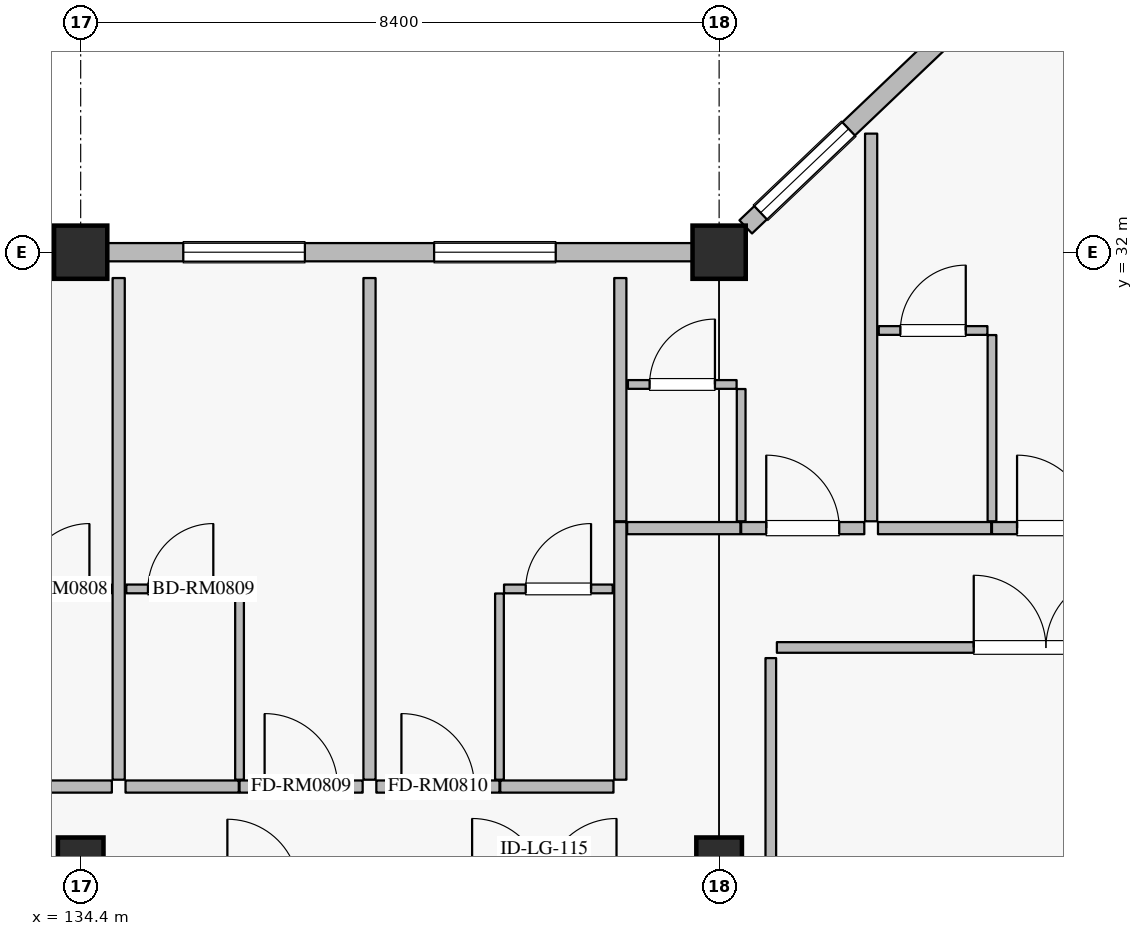
"""IFC4 building model, lengths in metres.
Left out: names, types, materials, properties, quantities, classifications, styles, units other than length and angle.
Written with IfcOpenShell. Run it as: python <this file> out.ifc"""

import sys

from ifc_helpers import new_model, si_unit, direction, frame, frame_2d, origin, origin_2d, place, context, subcontext, project, spatial, rectangle, extrude, element, fill, save


model = new_model("IFC4")
c1 = context("Model", 3, precision=1e-05, world=origin(), true_north=direction((0.0, 1.0)))
c2 = subcontext(c1, "Body", "Model", "MODEL_VIEW")
j1 = project(units=[si_unit("LENGTHUNIT", "METRE"), si_unit("PLANEANGLEUNIT", "RADIAN")], contexts=[c1])
p1 = place(None, origin())
s1 = spatial("IfcSite", under=j1, at=p1, CompositionType="ELEMENT")
p2 = place(p1, origin())
s2 = spatial("IfcBuilding", under=s1, at=p2, CompositionType="ELEMENT")
p3 = place(p2, frame((0.0, 0.0, 32.4)))
s3 = spatial("IfcBuildingStorey", under=s2, at=p3, CompositionType="ELEMENT", Elevation=32.4)
for number, where, z_axis, x_axis in (
    (1, (134.4, 32.0, 0.0), (0.0, 0.0, 1.0), (1.0, 0.0, 0.0)),
    (2, (142.8, 32.0, 0.0), (0.0, 0.0, 1.0), (1.0, 0.0, 0.0)),
):
    element("IfcColumn", number, at=place(p3, frame(where, z_axis=z_axis, x_axis=x_axis)), inside=s3, PredefinedType="COLUMN", context=c2, shape_type="SweptSolid", body=[
        extrude(rectangle(XDim=0.7, YDim=0.7, at=origin_2d()), origin(), (0.0, 0.0, 1.0), 3.6),
    ])
for number, where, z_axis, x_axis in (
    (3, (134.4, 24.0, 0.0), (0.0, 0.0, 1.0), (1.0, 0.0, 0.0)),
    (4, (142.8, 24.0, 0.0), (0.0, 0.0, 1.0), (1.0, 0.0, 0.0)),
):
    element("IfcColumn", number, at=place(p3, frame(where, z_axis=z_axis, x_axis=x_axis)), inside=s3, PredefinedType="COLUMN", context=c2, shape_type="SweptSolid", body=[
        extrude(rectangle(XDim=0.6, YDim=0.6, at=origin_2d()), origin(), (0.0, 0.0, 1.0), 3.6),
    ])
p4 = place(p3, frame((126.35, 32.0, 0.0), z_axis=(0.0, 0.0, 1.0), x_axis=(1.0, 0.0, 0.0)))
e5 = element("IfcWall", 5, at=p4, inside=s3, PredefinedType="SOLIDWALL", context=c2, shape_type="SweptSolid", body=[
    extrude(rectangle(XDim=7.7, YDim=0.24, at=frame_2d((3.85, 0.0))), origin(), (0.0, 0.0, 1.0), 2.94),
])
p5 = place(p4, frame((0.125, 0.0, 0.8)))
e6 = element("IfcOpeningElement", 6, at=p5, cuts=e5, PredefinedType="OPENING", context=c2, shape_type="SweptSolid", body=[
    extrude(rectangle(XDim=1.6, YDim=1.6, at=frame_2d((0.8, 0.8))), frame((0.0, 0.13, 0.0), z_axis=(0.0, -1.0, 0.0), x_axis=(1.0, 0.0, 0.0)), (0.0, 0.0, 1.0), 0.26),
])
p6 = place(p4, frame((2.8, 0.0, 0.8)))
e7 = element("IfcOpeningElement", 7, at=p6, cuts=e5, PredefinedType="OPENING", context=c2, shape_type="SweptSolid", body=[
    extrude(rectangle(XDim=1.6, YDim=1.6, at=frame_2d((0.8, 0.8))), frame((0.0, 0.13, 0.0), z_axis=(0.0, -1.0, 0.0), x_axis=(1.0, 0.0, 0.0)), (0.0, 0.0, 1.0), 0.26),
])
p7 = place(p4, frame((5.725, 0.0, 0.8)))
e8 = element("IfcOpeningElement", 8, at=p7, cuts=e5, PredefinedType="OPENING", context=c2, shape_type="SweptSolid", body=[
    extrude(rectangle(XDim=1.6, YDim=1.6, at=frame_2d((0.8, 0.8))), frame((0.0, 0.13, 0.0), z_axis=(0.0, -1.0, 0.0), x_axis=(1.0, 0.0, 0.0)), (0.0, 0.0, 1.0), 0.26),
])
p8 = place(p3, frame((134.75, 32.0, 0.0), z_axis=(0.0, 0.0, 1.0), x_axis=(1.0, 0.0, 0.0)))
e9 = element("IfcWall", 9, at=p8, inside=s3, PredefinedType="SOLIDWALL", context=c2, shape_type="SweptSolid", body=[
    extrude(rectangle(XDim=7.7, YDim=0.24, at=frame_2d((3.85, 0.0))), origin(), (0.0, 0.0, 1.0), 2.94),
])
p9 = place(p8, frame((1.0, 0.0, 0.8)))
e10 = element("IfcOpeningElement", 10, at=p9, cuts=e9, PredefinedType="OPENING", context=c2, shape_type="SweptSolid", body=[
    extrude(rectangle(XDim=1.6, YDim=1.6, at=frame_2d((0.8, 0.8))), frame((0.0, 0.13, 0.0), z_axis=(0.0, -1.0, 0.0), x_axis=(1.0, 0.0, 0.0)), (0.0, 0.0, 1.0), 0.26),
])
p10 = place(p8, frame((4.3, 0.0, 0.8)))
e11 = element("IfcOpeningElement", 11, at=p10, cuts=e9, PredefinedType="OPENING", context=c2, shape_type="SweptSolid", body=[
    extrude(rectangle(XDim=1.6, YDim=1.6, at=frame_2d((0.8, 0.8))), frame((0.0, 0.13, 0.0), z_axis=(0.0, -1.0, 0.0), x_axis=(1.0, 0.0, 0.0)), (0.0, 0.0, 1.0), 0.26),
])
p11 = place(p3, frame((143.15, 32.333, 0.0), z_axis=(0.0, 0.0, 1.0), x_axis=(0.724116091282, 0.689678103427, 0.0)))
e12 = element("IfcWall", 12, at=p11, inside=s3, PredefinedType="SOLIDWALL", context=c2, shape_type="SweptSolid", body=[
    extrude(rectangle(XDim=10.634, YDim=0.24, at=frame_2d((5.317, 0.0))), origin(), (0.0, 0.0, 1.0), 2.94),
])
p12 = place(p11, frame((0.27, 0.0, 0.8)))
e13 = element("IfcOpeningElement", 13, at=p12, cuts=e12, PredefinedType="OPENING", context=c2, shape_type="SweptSolid", body=[
    extrude(rectangle(XDim=1.6, YDim=1.6, at=frame_2d((0.8, 0.8))), frame((0.0, 0.13, 0.0), z_axis=(0.0, -1.0, 0.0), x_axis=(1.0, 0.0, 0.0)), (0.0, 0.0, 1.0), 0.26),
])
p13 = place(p11, frame((3.757, 0.0, 0.8)))
e14 = element("IfcOpeningElement", 14, at=p13, cuts=e12, PredefinedType="OPENING", context=c2, shape_type="SweptSolid", body=[
    extrude(rectangle(XDim=1.6, YDim=1.6, at=frame_2d((0.8, 0.8))), frame((0.0, 0.13, 0.0), z_axis=(0.0, -1.0, 0.0), x_axis=(1.0, 0.0, 0.0)), (0.0, 0.0, 1.0), 0.26),
])
p14 = place(p11, frame((8.004, 0.0, 0.8)))
e15 = element("IfcOpeningElement", 15, at=p14, cuts=e12, PredefinedType="OPENING", context=c2, shape_type="SweptSolid", body=[
    extrude(rectangle(XDim=1.6, YDim=1.6, at=frame_2d((0.8, 0.8))), frame((0.0, 0.13, 0.0), z_axis=(0.0, -1.0, 0.0), x_axis=(1.0, 0.0, 0.0)), (0.0, 0.0, 1.0), 0.26),
])
p15 = place(p3, frame((133.32, 24.97, 0.0), z_axis=(0.0, 0.0, 1.0), x_axis=(1.0, 0.0, 0.0)))
e16 = element("IfcWall", 16, at=p15, inside=s3, PredefinedType="PARTITIONING", context=c2, shape_type="SweptSolid", body=[
    extrude(rectangle(XDim=1.49, YDim=0.16, at=frame_2d((0.745, 0.0))), origin(), (0.0, 0.0, 1.0), 3.335),
])
p16 = place(p3, frame((133.37, 27.57, 0.0), z_axis=(0.0, 0.0, 1.0), x_axis=(1.0, 0.0, 0.0)))
e17 = element("IfcWall", 17, at=p16, inside=s3, PredefinedType="PARTITIONING", context=c2, shape_type="SweptSolid", body=[
    extrude(rectangle(XDim=1.43, YDim=0.115, at=frame_2d((0.715, 0.0))), origin(), (0.0, 0.0, 1.0), 3.335),
])
p17 = place(p16, frame((0.285, 0.0, 0.0)))
e18 = element("IfcOpeningElement", 18, at=p17, cuts=e17, PredefinedType="OPENING", context=c2, shape_type="SweptSolid", body=[
    extrude(rectangle(XDim=0.86, YDim=2.12, at=frame_2d((0.43, 1.06))), frame((0.0, 0.067, 0.0), z_axis=(0.0, -1.0, 0.0), x_axis=(1.0, 0.0, 0.0)), (0.0, 0.0, 1.0), 0.135),
])
p18 = place(p3, frame((134.99, 24.97, 0.0), z_axis=(0.0, 0.0, 1.0), x_axis=(1.0, 0.0, 0.0)))
e19 = element("IfcWall", 19, at=p18, inside=s3, PredefinedType="PARTITIONING", context=c2, shape_type="SweptSolid", body=[
    extrude(rectangle(XDim=1.49, YDim=0.16, at=frame_2d((0.745, 0.0))), origin(), (0.0, 0.0, 1.0), 3.335),
])
p19 = place(p3, frame((136.49, 24.97, 0.0), z_axis=(0.0, 0.0, 1.0), x_axis=(1.0, 0.0, 0.0)))
e20 = element("IfcWall", 20, at=p19, inside=s3, PredefinedType="PARTITIONING", context=c2, shape_type="SweptSolid", body=[
    extrude(rectangle(XDim=1.62, YDim=0.16, at=frame_2d((0.81, 0.0))), origin(), (0.0, 0.0, 1.0), 3.335),
])
p20 = place(p19, frame((0.33, 0.0, 0.0)))
e21 = element("IfcOpeningElement", 21, at=p20, cuts=e20, PredefinedType="OPENING", context=c2, shape_type="SweptSolid", body=[
    extrude(rectangle(XDim=0.96, YDim=2.2, at=frame_2d((0.48, 1.1))), frame((0.0, 0.09, 0.0), z_axis=(0.0, -1.0, 0.0), x_axis=(1.0, 0.0, 0.0)), (0.0, 0.0, 1.0), 0.18),
])
p21 = place(p3, frame((136.49, 25.06, 0.0), z_axis=(0.0, 0.0, 1.0), x_axis=(0.0, 1.0, 0.0)))
e22 = element("IfcWall", 22, at=p21, inside=s3, PredefinedType="PARTITIONING", context=c2, shape_type="SweptSolid", body=[
    extrude(rectangle(XDim=2.45, YDim=0.115, at=frame_2d((1.225, 0.0))), origin(), (0.0, 0.0, 1.0), 3.335),
])
p22 = place(p3, frame((135.0, 27.57, 0.0), z_axis=(0.0, 0.0, 1.0), x_axis=(1.0, 0.0, 0.0)))
e23 = element("IfcWall", 23, at=p22, inside=s3, PredefinedType="PARTITIONING", context=c2, shape_type="SweptSolid", body=[
    extrude(rectangle(XDim=1.43, YDim=0.115, at=frame_2d((0.715, 0.0))), origin(), (0.0, 0.0, 1.0), 3.335),
])
p23 = place(p22, frame((0.285, 0.0, 0.0)))
e24 = element("IfcOpeningElement", 24, at=p23, cuts=e23, PredefinedType="OPENING", context=c2, shape_type="SweptSolid", body=[
    extrude(rectangle(XDim=0.86, YDim=2.12, at=frame_2d((0.43, 1.06))), frame((0.0, 0.067, 0.0), z_axis=(0.0, -1.0, 0.0), x_axis=(1.0, 0.0, 0.0)), (0.0, 0.0, 1.0), 0.135),
])
p24 = place(p3, frame((134.9, 25.06, 0.0), z_axis=(0.0, 0.0, 1.0), x_axis=(0.0, 1.0, 0.0)))
e25 = element("IfcWall", 25, at=p24, inside=s3, PredefinedType="PARTITIONING", context=c2, shape_type="SweptSolid", body=[
    extrude(rectangle(XDim=6.6, YDim=0.16, at=frame_2d((3.3, 0.0))), origin(), (0.0, 0.0, 1.0), 3.335),
])
p25 = place(p3, frame((138.29, 24.97, 0.0), z_axis=(0.0, 0.0, 1.0), x_axis=(1.0, 0.0, 0.0)))
e26 = element("IfcWall", 26, at=p25, inside=s3, PredefinedType="PARTITIONING", context=c2, shape_type="SweptSolid", body=[
    extrude(rectangle(XDim=1.62, YDim=0.16, at=frame_2d((0.81, 0.0))), origin(), (0.0, 0.0, 1.0), 3.335),
])
p26 = place(p25, frame((0.33, 0.0, 0.0)))
e27 = element("IfcOpeningElement", 27, at=p26, cuts=e26, PredefinedType="OPENING", context=c2, shape_type="SweptSolid", body=[
    extrude(rectangle(XDim=0.96, YDim=2.2, at=frame_2d((0.48, 1.1))), frame((0.0, 0.09, 0.0), z_axis=(0.0, -1.0, 0.0), x_axis=(1.0, 0.0, 0.0)), (0.0, 0.0, 1.0), 0.18),
])
p27 = place(p3, frame((139.92, 24.97, 0.0), z_axis=(0.0, 0.0, 1.0), x_axis=(1.0, 0.0, 0.0)))
e28 = element("IfcWall", 28, at=p27, inside=s3, PredefinedType="PARTITIONING", context=c2, shape_type="SweptSolid", body=[
    extrude(rectangle(XDim=1.49, YDim=0.16, at=frame_2d((0.745, 0.0))), origin(), (0.0, 0.0, 1.0), 3.335),
])
p28 = place(p3, frame((139.91, 25.06, 0.0), z_axis=(0.0, 0.0, 1.0), x_axis=(0.0, 1.0, 0.0)))
e29 = element("IfcWall", 29, at=p28, inside=s3, PredefinedType="PARTITIONING", context=c2, shape_type="SweptSolid", body=[
    extrude(rectangle(XDim=2.45, YDim=0.115, at=frame_2d((1.225, 0.0))), origin(), (0.0, 0.0, 1.0), 3.335),
])
p29 = place(p3, frame((139.97, 27.57, 0.0), z_axis=(0.0, 0.0, 1.0), x_axis=(1.0, 0.0, 0.0)))
e30 = element("IfcWall", 30, at=p29, inside=s3, PredefinedType="PARTITIONING", context=c2, shape_type="SweptSolid", body=[
    extrude(rectangle(XDim=1.43, YDim=0.115, at=frame_2d((0.715, 0.0))), origin(), (0.0, 0.0, 1.0), 3.335),
])
p30 = place(p29, frame((0.285, 0.0, 0.0)))
e31 = element("IfcOpeningElement", 31, at=p30, cuts=e30, PredefinedType="OPENING", context=c2, shape_type="SweptSolid", body=[
    extrude(rectangle(XDim=0.86, YDim=2.12, at=frame_2d((0.43, 1.06))), frame((0.0, 0.067, 0.0), z_axis=(0.0, -1.0, 0.0), x_axis=(1.0, 0.0, 0.0)), (0.0, 0.0, 1.0), 0.135),
])
p31 = place(p3, frame((138.2, 25.06, 0.0), z_axis=(0.0, 0.0, 1.0), x_axis=(0.0, 1.0, 0.0)))
e32 = element("IfcWall", 32, at=p31, inside=s3, PredefinedType="PARTITIONING", context=c2, shape_type="SweptSolid", body=[
    extrude(rectangle(XDim=6.6, YDim=0.16, at=frame_2d((3.3, 0.0))), origin(), (0.0, 0.0, 1.0), 3.335),
])
p32 = place(p3, frame((141.5, 25.06, 0.0), z_axis=(0.0, 0.0, 1.0), x_axis=(0.0, 1.0, 0.0)))
e33 = element("IfcWall", 33, at=p32, inside=s3, PredefinedType="PARTITIONING", context=c2, shape_type="SweptSolid", body=[
    extrude(rectangle(XDim=3.39, YDim=0.16, at=frame_2d((1.695, 0.0))), origin(), (0.0, 0.0, 1.0), 3.335),
])
p33 = place(p3, frame((141.59, 28.37, 0.0), z_axis=(0.0, 0.0, 1.0), x_axis=(1.0, 0.0, 0.0)))
e34 = element("IfcWall", 34, at=p33, inside=s3, PredefinedType="PARTITIONING", context=c2, shape_type="SweptSolid", body=[
    extrude(rectangle(XDim=1.49, YDim=0.16, at=frame_2d((0.745, 0.0))), origin(), (0.0, 0.0, 1.0), 3.335),
])
p34 = place(p3, frame((143.09, 28.37, 0.0), z_axis=(0.0, 0.0, 1.0), x_axis=(1.0, 0.0, 0.0)))
e35 = element("IfcWall", 35, at=p34, inside=s3, PredefinedType="PARTITIONING", context=c2, shape_type="SweptSolid", body=[
    extrude(rectangle(XDim=1.62, YDim=0.16, at=frame_2d((0.81, 0.0))), origin(), (0.0, 0.0, 1.0), 3.335),
])
p35 = place(p34, frame((0.33, 0.0, 0.0)))
e36 = element("IfcOpeningElement", 36, at=p35, cuts=e35, PredefinedType="OPENING", context=c2, shape_type="SweptSolid", body=[
    extrude(rectangle(XDim=0.96, YDim=2.2, at=frame_2d((0.48, 1.1))), frame((0.0, 0.09, 0.0), z_axis=(0.0, -1.0, 0.0), x_axis=(1.0, 0.0, 0.0)), (0.0, 0.0, 1.0), 0.18),
])
p36 = place(p3, frame((143.09, 28.46, 0.0), z_axis=(0.0, 0.0, 1.0), x_axis=(0.0, 1.0, 0.0)))
e37 = element("IfcWall", 37, at=p36, inside=s3, PredefinedType="PARTITIONING", context=c2, shape_type="SweptSolid", body=[
    extrude(rectangle(XDim=1.74, YDim=0.115, at=frame_2d((0.87, 0.0))), origin(), (0.0, 0.0, 1.0), 3.335),
])
p37 = place(p3, frame((141.6, 30.26, 0.0), z_axis=(0.0, 0.0, 1.0), x_axis=(1.0, 0.0, 0.0)))
e38 = element("IfcWall", 38, at=p37, inside=s3, PredefinedType="PARTITIONING", context=c2, shape_type="SweptSolid", body=[
    extrude(rectangle(XDim=1.43, YDim=0.115, at=frame_2d((0.715, 0.0))), origin(), (0.0, 0.0, 1.0), 3.335),
])
p38 = place(p37, frame((0.285, 0.0, 0.0)))
e39 = element("IfcOpeningElement", 39, at=p38, cuts=e38, PredefinedType="OPENING", context=c2, shape_type="SweptSolid", body=[
    extrude(rectangle(XDim=0.86, YDim=2.12, at=frame_2d((0.43, 1.06))), frame((0.0, 0.067, 0.0), z_axis=(0.0, -1.0, 0.0), x_axis=(1.0, 0.0, 0.0)), (0.0, 0.0, 1.0), 0.135),
])
p39 = place(p3, frame((141.5, 28.46, 0.0), z_axis=(0.0, 0.0, 1.0), x_axis=(0.0, 1.0, 0.0)))
e40 = element("IfcWall", 40, at=p39, inside=s3, PredefinedType="PARTITIONING", context=c2, shape_type="SweptSolid", body=[
    extrude(rectangle(XDim=3.2, YDim=0.16, at=frame_2d((1.6, 0.0))), origin(), (0.0, 0.0, 1.0), 3.335),
])
p40 = place(p3, frame((144.89, 28.37, 0.0), z_axis=(0.0, 0.0, 1.0), x_axis=(1.0, 0.0, 0.0)))
e41 = element("IfcWall", 41, at=p40, inside=s3, PredefinedType="PARTITIONING", context=c2, shape_type="SweptSolid", body=[
    extrude(rectangle(XDim=1.49, YDim=0.16, at=frame_2d((0.745, 0.0))), origin(), (0.0, 0.0, 1.0), 3.335),
])
p41 = place(p3, frame((146.39, 28.37, 0.0), z_axis=(0.0, 0.0, 1.0), x_axis=(1.0, 0.0, 0.0)))
e42 = element("IfcWall", 42, at=p41, inside=s3, PredefinedType="PARTITIONING", context=c2, shape_type="SweptSolid", body=[
    extrude(rectangle(XDim=1.62, YDim=0.16, at=frame_2d((0.81, 0.0))), origin(), (0.0, 0.0, 1.0), 3.335),
])
p42 = place(p41, frame((0.33, 0.0, 0.0)))
e43 = element("IfcOpeningElement", 43, at=p42, cuts=e42, PredefinedType="OPENING", context=c2, shape_type="SweptSolid", body=[
    extrude(rectangle(XDim=0.96, YDim=2.2, at=frame_2d((0.48, 1.1))), frame((0.0, 0.09, 0.0), z_axis=(0.0, -1.0, 0.0), x_axis=(1.0, 0.0, 0.0)), (0.0, 0.0, 1.0), 0.18),
])
p43 = place(p3, frame((146.39, 28.46, 0.0), z_axis=(0.0, 0.0, 1.0), x_axis=(0.0, 1.0, 0.0)))
e44 = element("IfcWall", 44, at=p43, inside=s3, PredefinedType="PARTITIONING", context=c2, shape_type="SweptSolid", body=[
    extrude(rectangle(XDim=2.45, YDim=0.115, at=frame_2d((1.225, 0.0))), origin(), (0.0, 0.0, 1.0), 3.335),
])
p44 = place(p3, frame((144.9, 30.97, 0.0), z_axis=(0.0, 0.0, 1.0), x_axis=(1.0, 0.0, 0.0)))
e45 = element("IfcWall", 45, at=p44, inside=s3, PredefinedType="PARTITIONING", context=c2, shape_type="SweptSolid", body=[
    extrude(rectangle(XDim=1.43, YDim=0.115, at=frame_2d((0.715, 0.0))), origin(), (0.0, 0.0, 1.0), 3.335),
])
p45 = place(p44, frame((0.285, 0.0, 0.0)))
e46 = element("IfcOpeningElement", 46, at=p45, cuts=e45, PredefinedType="OPENING", context=c2, shape_type="SweptSolid", body=[
    extrude(rectangle(XDim=0.86, YDim=2.12, at=frame_2d((0.43, 1.06))), frame((0.0, 0.067, 0.0), z_axis=(0.0, -1.0, 0.0), x_axis=(1.0, 0.0, 0.0)), (0.0, 0.0, 1.0), 0.135),
])
p46 = place(p3, frame((144.8, 28.46, 0.0), z_axis=(0.0, 0.0, 1.0), x_axis=(0.0, 1.0, 0.0)))
e47 = element("IfcWall", 47, at=p46, inside=s3, PredefinedType="PARTITIONING", context=c2, shape_type="SweptSolid", body=[
    extrude(rectangle(XDim=5.1, YDim=0.16, at=frame_2d((2.55, 0.0))), origin(), (0.0, 0.0, 1.0), 3.335),
])
p47 = place(p3, frame((143.56, 26.8, 0.0), z_axis=(0.0, 0.0, 1.0), x_axis=(1.0, 0.0, 0.0)))
e48 = element("IfcWall", 48, at=p47, inside=s3, PredefinedType="PARTITIONING", context=c2, shape_type="SweptSolid", body=[
    extrude(rectangle(XDim=7.08, YDim=0.14, at=frame_2d((3.54, 0.0))), origin(), (0.0, 0.0, 1.0), 3.335),
])
p48 = place(p47, frame((2.59, 0.0, 0.0)))
e49 = element("IfcOpeningElement", 49, at=p48, cuts=e48, PredefinedType="OPENING", context=c2, shape_type="SweptSolid", body=[
    extrude(rectangle(XDim=1.9, YDim=2.4, at=frame_2d((0.95, 1.2))), frame((0.0, 0.08, 0.0), z_axis=(0.0, -1.0, 0.0), x_axis=(1.0, 0.0, 0.0)), (0.0, 0.0, 1.0), 0.16),
])
p49 = place(p3, frame((143.48, 23.45, 0.0), z_axis=(0.0, 0.0, 1.0), x_axis=(0.0, 1.0, 0.0)))
e50 = element("IfcWall", 50, at=p49, inside=s3, PredefinedType="PARTITIONING", context=c2, shape_type="SweptSolid", body=[
    extrude(rectangle(XDim=3.21, YDim=0.14, at=frame_2d((1.605, 0.0))), origin(), (0.0, 0.0, 1.0), 3.335),
])
p50 = place(p9, origin())
e51 = element("IfcWindow", 51, at=p50, inside=s3, PartitioningType="SINGLE_PANEL", PredefinedType="WINDOW", context=c2, shape_type="SweptSolid", body=[
    extrude(rectangle(XDim=1.6, YDim=1.6, at=frame_2d((0.8, 0.8))), frame((0.0, 0.03, 0.0), z_axis=(0.0, -1.0, 0.0), x_axis=(1.0, 0.0, 0.0)), (0.0, 0.0, 1.0), 0.06),
])
fill(e10, e51)
p51 = place(p10, origin())
e52 = element("IfcWindow", 52, at=p51, inside=s3, PartitioningType="SINGLE_PANEL", PredefinedType="WINDOW", context=c2, shape_type="SweptSolid", body=[
    extrude(rectangle(XDim=1.6, YDim=1.6, at=frame_2d((0.8, 0.8))), frame((0.0, 0.03, 0.0), z_axis=(0.0, -1.0, 0.0), x_axis=(1.0, 0.0, 0.0)), (0.0, 0.0, 1.0), 0.06),
])
fill(e11, e52)
p52 = place(p12, origin())
e53 = element("IfcWindow", 53, at=p52, inside=s3, PartitioningType="SINGLE_PANEL", PredefinedType="WINDOW", context=c2, shape_type="SweptSolid", body=[
    extrude(rectangle(XDim=1.6, YDim=1.6, at=frame_2d((0.8, 0.8))), frame((0.0, 0.03, 0.0), z_axis=(0.0, -1.0, 0.0), x_axis=(1.0, 0.0, 0.0)), (0.0, 0.0, 1.0), 0.06),
])
fill(e13, e53)
p53 = place(p17, origin())
e54 = element("IfcDoor", 54, at=p53, inside=s3, OperationType="SINGLE_SWING_RIGHT", PredefinedType="DOOR", context=c2, shape_type="SweptSolid", body=[
    extrude(rectangle(XDim=0.86, YDim=2.12, at=frame_2d((0.43, 1.06))), frame((0.0, 0.025, 0.0), z_axis=(0.0, -1.0, 0.0), x_axis=(1.0, 0.0, 0.0)), (0.0, 0.0, 1.0), 0.05),
])
fill(e18, e54)
p54 = place(p20, origin())
e55 = element("IfcDoor", 55, at=p54, inside=s3, OperationType="SINGLE_SWING_LEFT", PredefinedType="DOOR", context=c2, shape_type="SweptSolid", body=[
    extrude(rectangle(XDim=0.96, YDim=2.2, at=frame_2d((0.48, 1.1))), frame((0.0, 0.025, 0.0), z_axis=(0.0, -1.0, 0.0), x_axis=(1.0, 0.0, 0.0)), (0.0, 0.0, 1.0), 0.05),
])
fill(e21, e55)
p55 = place(p23, origin())
e56 = element("IfcDoor", 56, at=p55, inside=s3, OperationType="SINGLE_SWING_RIGHT", PredefinedType="DOOR", context=c2, shape_type="SweptSolid", body=[
    extrude(rectangle(XDim=0.86, YDim=2.12, at=frame_2d((0.43, 1.06))), frame((0.0, 0.025, 0.0), z_axis=(0.0, -1.0, 0.0), x_axis=(1.0, 0.0, 0.0)), (0.0, 0.0, 1.0), 0.05),
])
fill(e24, e56)
p56 = place(p26, origin())
e57 = element("IfcDoor", 57, at=p56, inside=s3, OperationType="SINGLE_SWING_LEFT", PredefinedType="DOOR", context=c2, shape_type="SweptSolid", body=[
    extrude(rectangle(XDim=0.96, YDim=2.2, at=frame_2d((0.48, 1.1))), frame((0.0, 0.025, 0.0), z_axis=(0.0, -1.0, 0.0), x_axis=(1.0, 0.0, 0.0)), (0.0, 0.0, 1.0), 0.05),
])
fill(e27, e57)
p57 = place(p30, origin())
e58 = element("IfcDoor", 58, at=p57, inside=s3, OperationType="SINGLE_SWING_RIGHT", PredefinedType="DOOR", context=c2, shape_type="SweptSolid", body=[
    extrude(rectangle(XDim=0.86, YDim=2.12, at=frame_2d((0.43, 1.06))), frame((0.0, 0.025, 0.0), z_axis=(0.0, -1.0, 0.0), x_axis=(1.0, 0.0, 0.0)), (0.0, 0.0, 1.0), 0.05),
])
fill(e31, e58)
p58 = place(p35, origin())
e59 = element("IfcDoor", 59, at=p58, inside=s3, OperationType="SINGLE_SWING_LEFT", PredefinedType="DOOR", context=c2, shape_type="SweptSolid", body=[
    extrude(rectangle(XDim=0.96, YDim=2.2, at=frame_2d((0.48, 1.1))), frame((0.0, 0.025, 0.0), z_axis=(0.0, -1.0, 0.0), x_axis=(1.0, 0.0, 0.0)), (0.0, 0.0, 1.0), 0.05),
])
fill(e36, e59)
p59 = place(p38, origin())
e60 = element("IfcDoor", 60, at=p59, inside=s3, OperationType="SINGLE_SWING_RIGHT", PredefinedType="DOOR", context=c2, shape_type="SweptSolid", body=[
    extrude(rectangle(XDim=0.86, YDim=2.12, at=frame_2d((0.43, 1.06))), frame((0.0, 0.025, 0.0), z_axis=(0.0, -1.0, 0.0), x_axis=(1.0, 0.0, 0.0)), (0.0, 0.0, 1.0), 0.05),
])
fill(e39, e60)
p60 = place(p42, origin())
e61 = element("IfcDoor", 61, at=p60, inside=s3, OperationType="SINGLE_SWING_LEFT", PredefinedType="DOOR", context=c2, shape_type="SweptSolid", body=[
    extrude(rectangle(XDim=0.96, YDim=2.2, at=frame_2d((0.48, 1.1))), frame((0.0, 0.025, 0.0), z_axis=(0.0, -1.0, 0.0), x_axis=(1.0, 0.0, 0.0)), (0.0, 0.0, 1.0), 0.05),
])
fill(e43, e61)
p61 = place(p45, origin())
e62 = element("IfcDoor", 62, at=p61, inside=s3, OperationType="SINGLE_SWING_RIGHT", PredefinedType="DOOR", context=c2, shape_type="SweptSolid", body=[
    extrude(rectangle(XDim=0.86, YDim=2.12, at=frame_2d((0.43, 1.06))), frame((0.0, 0.025, 0.0), z_axis=(0.0, -1.0, 0.0), x_axis=(1.0, 0.0, 0.0)), (0.0, 0.0, 1.0), 0.05),
])
fill(e46, e62)
p62 = place(p48, origin())
e63 = element("IfcDoor", 63, at=p62, inside=s3, OperationType="DOUBLE_DOOR_SINGLE_SWING", PredefinedType="DOOR", context=c2, shape_type="SweptSolid", body=[
    extrude(rectangle(XDim=1.9, YDim=2.4, at=frame_2d((0.95, 1.2))), frame((0.0, 0.025, 0.0), z_axis=(0.0, -1.0, 0.0), x_axis=(1.0, 0.0, 0.0)), (0.0, 0.0, 1.0), 0.05),
])
fill(e49, e63)
save(model, sys.argv[1])
